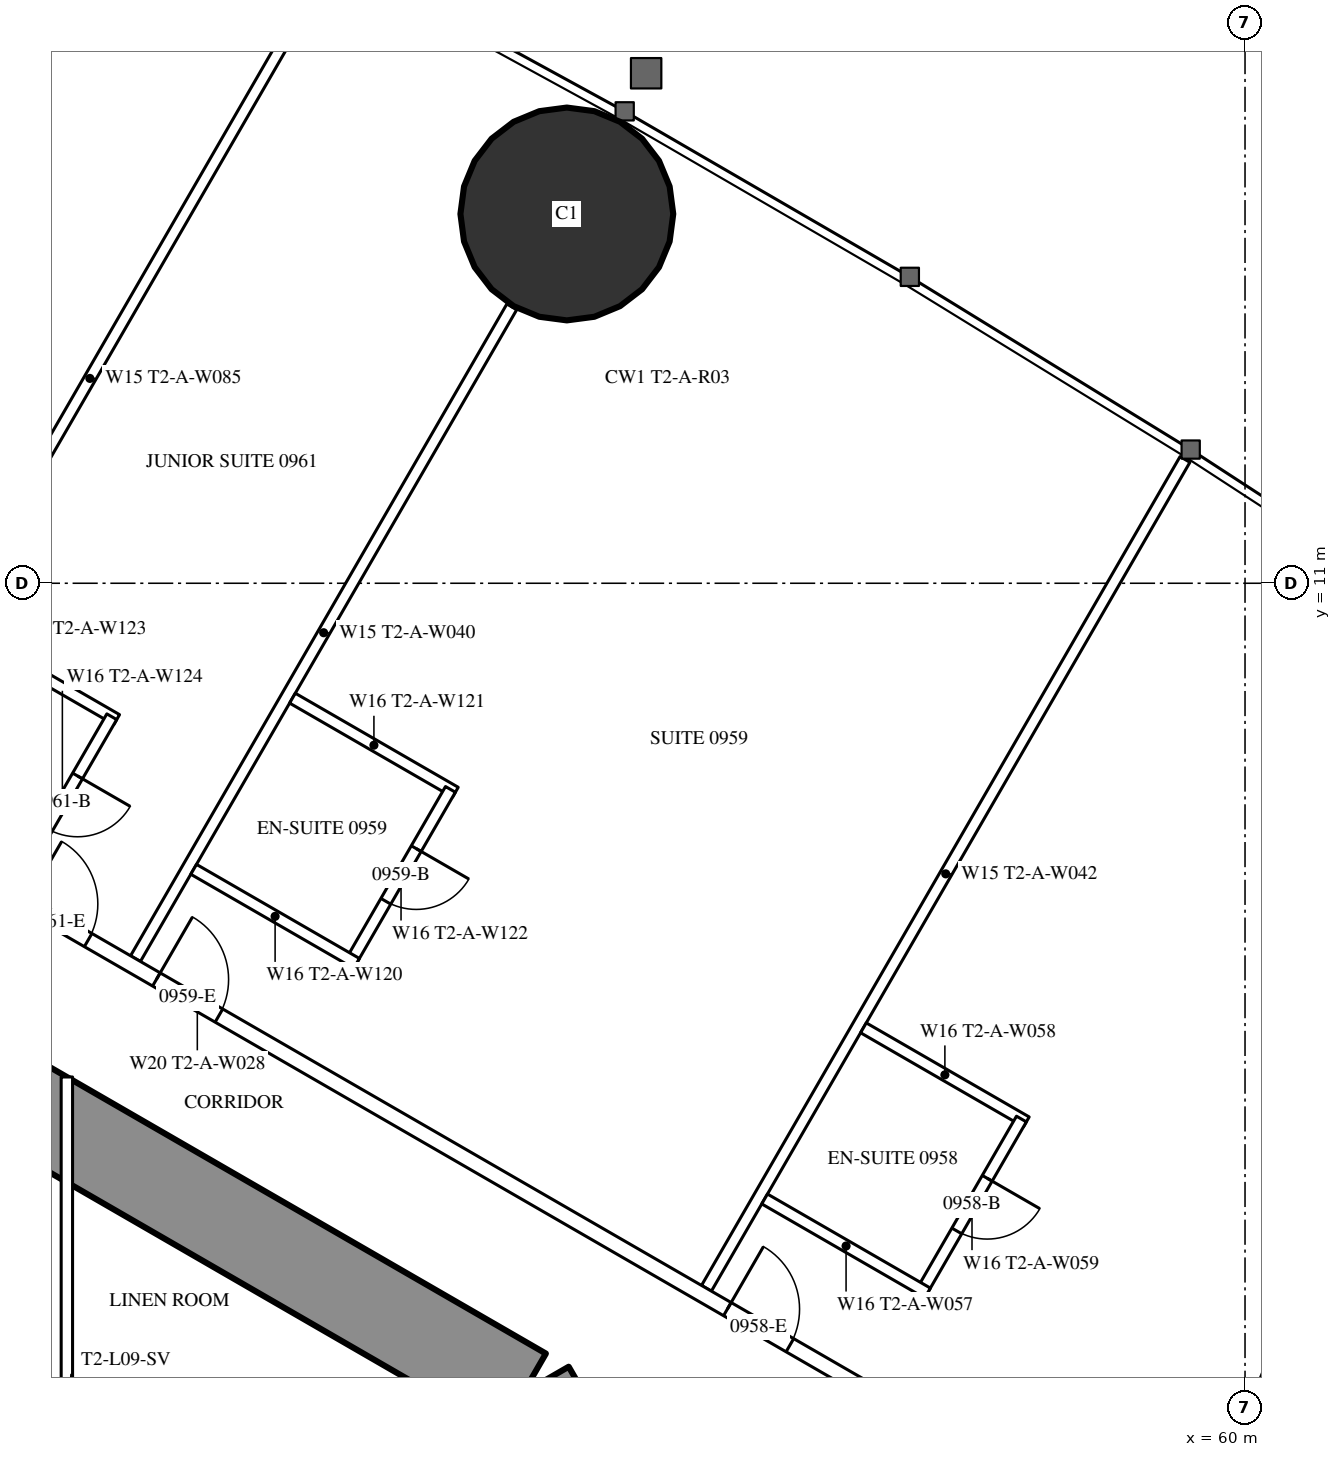
"""IFC4 building model, lengths in metres.
Left out: names, types, materials, properties, quantities, classifications, styles, units other than length and angle.
Written with IfcOpenShell. Run it as: python <this file> out.ifc"""

import sys

from ifc_helpers import new_model, si_unit, direction, frame, frame_2d, origin, origin_2d, place, context, subcontext, project, spatial, rectangle, hollow_circle, extrude, element, fill, save


model = new_model("IFC4")
c1 = context("Model", 3, precision=1e-05, world=origin(), true_north=direction((0.0, 1.0)))
c2 = subcontext(c1, "Body", "Model", "MODEL_VIEW")
j1 = project(units=[si_unit("LENGTHUNIT", "METRE"), si_unit("PLANEANGLEUNIT", "RADIAN")], contexts=[c1])
p1 = place(None, origin())
s1 = spatial("IfcSite", under=j1, at=p1, CompositionType="ELEMENT")
p2 = place(p1, origin())
s2 = spatial("IfcBuilding", under=s1, at=p2, CompositionType="ELEMENT")
p3 = place(p2, frame((0.0, 0.0, 39.0)))
s3 = spatial("IfcBuildingStorey", under=s2, at=p3, CompositionType="ELEMENT", Elevation=39.0)
p4 = place(p3, frame((51.078, 15.858, 0.0), z_axis=(0.0, 0.0, 1.0), x_axis=(1.0, 0.0, 0.0)))
e1 = element("IfcColumn", 1, at=p4, inside=s3, PredefinedType="COLUMN", context=c2, shape_type="SweptSolid", body=[
    extrude(hollow_circle(Radius=1.4, WallThickness=0.12, at=origin_2d()), origin(), (0.0, 0.0, 1.0), 3.5),
])
p5 = place(p3, frame((61.5, 0.0, 0.0), z_axis=(0.0, 0.0, 1.0), x_axis=(1.0, 0.0, 0.0)))
e2 = element("IfcColumn", 2, at=p5, inside=s3, PredefinedType="COLUMN", context=c2, shape_type="SweptSolid", body=[
    extrude(hollow_circle(Radius=1.4, WallThickness=0.1, at=origin_2d()), origin(), (0.0, 0.0, 1.0), 3.5),
])
p6 = place(p3, frame((27.2, -13.8, 0.0), z_axis=(0.0, 0.0, 1.0), x_axis=(0.866027159892, 0.499996958321, 0.0)))
e3 = element("IfcWall", 3, at=p6, inside=s3, PredefinedType="SHEAR", context=c2, shape_type="SweptSolid", body=[
    extrude(rectangle(XDim=27.947, YDim=1.2, at=frame_2d((13.973, 0.0))), origin(), (0.0, 0.0, 1.0), 3.5),
])
p7 = place(p6, frame((4.6, 0.0, 0.0)))
e4 = element("IfcOpeningElement", 4, at=p7, cuts=e3, PredefinedType="OPENING", context=c2, shape_type="SweptSolid", body=[
    extrude(rectangle(XDim=1.0, YDim=2.2, at=frame_2d((0.5, 1.1))), frame((0.0, 0.61, 0.0), z_axis=(0.0, -1.0, 0.0), x_axis=(1.0, 0.0, 0.0)), (0.0, 0.0, 1.0), 1.22),
])
p8 = place(p6, frame((13.395, 0.0, 0.0)))
e5 = element("IfcOpeningElement", 5, at=p8, cuts=e3, PredefinedType="OPENING", context=c2, shape_type="SweptSolid", body=[
    extrude(rectangle(XDim=1.8, YDim=2.2, at=frame_2d((0.9, 1.1))), frame((0.0, 0.61, 0.0), z_axis=(0.0, -1.0, 0.0), x_axis=(1.0, 0.0, 0.0)), (0.0, 0.0, 1.0), 1.22),
])
p9 = place(p3, frame((27.2, 13.8, 0.0), z_axis=(0.0, 0.0, 1.0), x_axis=(0.866024515034, -0.500001539357, 0.0)))
e6 = element("IfcWall", 6, at=p9, inside=s3, PredefinedType="SHEAR", context=c2, shape_type="SweptSolid", body=[
    extrude(rectangle(XDim=26.907, YDim=1.2, at=frame_2d((13.454, 0.0))), origin(), (0.0, 0.0, 1.0), 3.5),
])
p10 = place(p9, frame((4.6, 0.0, 0.0)))
e7 = element("IfcOpeningElement", 7, at=p10, cuts=e6, PredefinedType="OPENING", context=c2, shape_type="SweptSolid", body=[
    extrude(rectangle(XDim=1.0, YDim=2.2, at=frame_2d((0.5, 1.1))), frame((0.0, 0.61, 0.0), z_axis=(0.0, -1.0, 0.0), x_axis=(1.0, 0.0, 0.0)), (0.0, 0.0, 1.0), 1.22),
])
p11 = place(p9, frame((13.395, 0.0, 0.0)))
e8 = element("IfcOpeningElement", 8, at=p11, cuts=e6, PredefinedType="OPENING", context=c2, shape_type="SweptSolid", body=[
    extrude(rectangle(XDim=1.8, YDim=2.2, at=frame_2d((0.9, 1.1))), frame((0.0, 0.61, 0.0), z_axis=(0.0, -1.0, 0.0), x_axis=(1.0, 0.0, 0.0)), (0.0, 0.0, 1.0), 1.22),
])
p12 = place(p3, frame((41.647, 8.23, 0.0), z_axis=(0.0, 0.0, 1.0), x_axis=(0.49998590462, 0.866033541603, 0.0)))
e9 = element("IfcWall", 9, at=p12, inside=s3, PredefinedType="PARTITIONING", context=c2, shape_type="SweptSolid", body=[
    extrude(rectangle(XDim=12.621, YDim=0.15, at=frame_2d((6.311, 0.0))), origin(), (0.0, 0.0, 1.0), 3.25),
])
p13 = place(p3, frame((45.403, 6.062, 0.0), z_axis=(0.0, 0.0, 1.0), x_axis=(0.500013434677, 0.866017647131, 0.0)))
e10 = element("IfcWall", 10, at=p13, inside=s3, PredefinedType="PARTITIONING", context=c2, shape_type="SweptSolid", body=[
    extrude(rectangle(XDim=9.902, YDim=0.15, at=frame_2d((4.951, 0.0))), origin(), (0.0, 0.0, 1.0), 2.25),
])
p14 = place(p3, frame((52.915, 1.725, 0.0), z_axis=(0.0, 0.0, 1.0), x_axis=(0.499997163113, 0.866027041656, 0.0)))
e11 = element("IfcWall", 11, at=p14, inside=s3, PredefinedType="PARTITIONING", context=c2, shape_type="SweptSolid", body=[
    extrude(rectangle(XDim=12.591, YDim=0.15, at=frame_2d((6.295, 0.0))), origin(), (0.0, 0.0, 1.0), 3.25),
])
p15 = place(p3, frame((36.834, 10.894, 0.0), z_axis=(0.0, 0.0, 1.0), x_axis=(0.866028157229, -0.499995230863, 0.0)))
e12 = element("IfcWall", 12, at=p15, inside=s3, PredefinedType="PARTITIONING", context=c2, shape_type="SweptSolid", body=[
    extrude(rectangle(XDim=21.667, YDim=0.2, at=frame_2d((10.833, 0.0))), origin(), (0.0, 0.0, 1.0), 3.25),
])
p16 = place(p15, frame((18.885, 0.0, 0.0)))
e13 = element("IfcOpeningElement", 13, at=p16, cuts=e12, PredefinedType="OPENING", context=c2, shape_type="SweptSolid", body=[
    extrude(rectangle(XDim=0.95, YDim=2.2, at=frame_2d((0.475, 1.1))), frame((0.0, 0.11, 0.0), z_axis=(0.0, -1.0, 0.0), x_axis=(1.0, 0.0, 0.0)), (0.0, 0.0, 1.0), 0.22),
])
p17 = place(p15, frame((10.212, 0.0, 0.0)))
e14 = element("IfcOpeningElement", 14, at=p17, cuts=e12, PredefinedType="OPENING", context=c2, shape_type="SweptSolid", body=[
    extrude(rectangle(XDim=0.95, YDim=2.2, at=frame_2d((0.475, 1.1))), frame((0.0, 0.11, 0.0), z_axis=(0.0, -1.0, 0.0), x_axis=(1.0, 0.0, 0.0)), (0.0, 0.0, 1.0), 0.22),
])
p18 = place(p15, frame((8.225, 0.0, 0.0)))
e15 = element("IfcOpeningElement", 15, at=p18, cuts=e12, PredefinedType="OPENING", context=c2, shape_type="SweptSolid", body=[
    extrude(rectangle(XDim=0.95, YDim=2.2, at=frame_2d((0.475, 1.1))), frame((0.0, 0.11, 0.0), z_axis=(0.0, -1.0, 0.0), x_axis=(1.0, 0.0, 0.0)), (0.0, 0.0, 1.0), 0.22),
])
p19 = place(p15, frame((1.825, 0.0, 0.0)))
e16 = element("IfcOpeningElement", 16, at=p19, cuts=e12, PredefinedType="OPENING", context=c2, shape_type="SweptSolid", body=[
    extrude(rectangle(XDim=0.95, YDim=2.2, at=frame_2d((0.475, 1.1))), frame((0.0, 0.11, 0.0), z_axis=(0.0, -1.0, 0.0), x_axis=(1.0, 0.0, 0.0)), (0.0, 0.0, 1.0), 0.22),
])
p20 = place(p15, frame((0.246, 0.0, 0.0)))
e17 = element("IfcOpeningElement", 17, at=p20, cuts=e12, PredefinedType="OPENING", context=c2, shape_type="SweptSolid", body=[
    extrude(rectangle(XDim=0.9, YDim=2.2, at=frame_2d((0.45, 1.1))), frame((0.0, 0.11, 0.0), z_axis=(0.0, -1.0, 0.0), x_axis=(1.0, 0.0, 0.0)), (0.0, 0.0, 1.0), 0.22),
])
p21 = place(p3, frame((54.98, 5.151, 0.0), z_axis=(0.0, 0.0, 1.0), x_axis=(0.86604923931, -0.499958713387, 0.0)))
e18 = element("IfcWall", 18, at=p21, inside=s3, PredefinedType="PARTITIONING", context=c2, shape_type="SweptSolid", body=[
    extrude(rectangle(XDim=2.475, YDim=0.15, at=frame_2d((1.237, 0.0))), origin(), (0.0, 0.0, 1.0), 3.25),
])
p22 = place(p3, frame((55.758, 1.7, 0.0), z_axis=(0.0, 0.0, 1.0), x_axis=(0.500006934395, 0.866021400173, 0.0)))
e19 = element("IfcWall", 19, at=p22, inside=s3, PredefinedType="PARTITIONING", context=c2, shape_type="SweptSolid", body=[
    extrude(rectangle(XDim=2.6, YDim=0.15, at=frame_2d((1.3, 0.0))), origin(), (0.0, 0.0, 1.0), 3.25),
])
p23 = place(p22, frame((0.9, 0.0, 0.0)))
e20 = element("IfcOpeningElement", 20, at=p23, cuts=e19, PredefinedType="OPENING", context=c2, shape_type="SweptSolid", body=[
    extrude(rectangle(XDim=0.8, YDim=2.2, at=frame_2d((0.4, 1.1))), frame((0.0, 0.085, 0.0), z_axis=(0.0, -1.0, 0.0), x_axis=(1.0, 0.0, 0.0)), (0.0, 0.0, 1.0), 0.17),
])
for number, where, z_axis, x_axis in (
    (21, (53.68, 2.9, 0.0), (0.0, 0.0, 1.0), (0.866, -0.5, 0.0)),
    (22, (47.468, 9.488, 0.0), (0.0, 0.0, 1.0), (0.866, -0.5, 0.0)),
):
    element("IfcWall", number, at=place(p3, frame(where, z_axis=z_axis, x_axis=x_axis)), inside=s3, PredefinedType="PARTITIONING", context=c2, shape_type="SweptSolid", body=[
        extrude(rectangle(XDim=2.475, YDim=0.15, at=frame_2d((1.237, 0.0))), origin(), (0.0, 0.0, 1.0), 3.25),
    ])
p24 = place(p3, frame((48.246, 6.037, 0.0), z_axis=(0.0, 0.0, 1.0), x_axis=(0.500006934395, 0.866021400173, 0.0)))
e23 = element("IfcWall", 23, at=p24, inside=s3, PredefinedType="PARTITIONING", context=c2, shape_type="SweptSolid", body=[
    extrude(rectangle(XDim=2.6, YDim=0.15, at=frame_2d((1.3, 0.0))), origin(), (0.0, 0.0, 1.0), 3.25),
])
p25 = place(p24, frame((0.9, 0.0, 0.0)))
e24 = element("IfcOpeningElement", 24, at=p25, cuts=e23, PredefinedType="OPENING", context=c2, shape_type="SweptSolid", body=[
    extrude(rectangle(XDim=0.8, YDim=2.2, at=frame_2d((0.4, 1.1))), frame((0.0, 0.085, 0.0), z_axis=(0.0, -1.0, 0.0), x_axis=(1.0, 0.0, 0.0)), (0.0, 0.0, 1.0), 0.17),
])
p26 = place(p3, frame((46.168, 7.237, 0.0), z_axis=(0.0, 0.0, 1.0), x_axis=(0.866006523861, -0.500032699561, 0.0)))
e25 = element("IfcWall", 25, at=p26, inside=s3, PredefinedType="PARTITIONING", context=c2, shape_type="SweptSolid", body=[
    extrude(rectangle(XDim=2.475, YDim=0.15, at=frame_2d((1.237, 0.0))), origin(), (0.0, 0.0, 1.0), 3.25),
])
p27 = place(p3, frame((43.012, 10.444, 0.0), z_axis=(0.0, 0.0, 1.0), x_axis=(0.866031185235, -0.4999899861, 0.0)))
e26 = element("IfcWall", 26, at=p27, inside=s3, PredefinedType="PARTITIONING", context=c2, shape_type="SweptSolid", body=[
    extrude(rectangle(XDim=2.475, YDim=0.15, at=frame_2d((1.238, 0.0))), origin(), (0.0, 0.0, 1.0), 3.25),
])
p28 = place(p3, frame((43.791, 6.993, 0.0), z_axis=(0.0, 0.0, 1.0), x_axis=(0.500047596559, 0.865997922154, 0.0)))
e27 = element("IfcWall", 27, at=p28, inside=s3, PredefinedType="PARTITIONING", context=c2, shape_type="SweptSolid", body=[
    extrude(rectangle(XDim=2.6, YDim=0.15, at=frame_2d((1.3, 0.0))), origin(), (0.0, 0.0, 1.0), 3.25),
])
p29 = place(p28, frame((0.9, 0.0, 0.0)))
e28 = element("IfcOpeningElement", 28, at=p29, cuts=e27, PredefinedType="OPENING", context=c2, shape_type="SweptSolid", body=[
    extrude(rectangle(XDim=0.8, YDim=2.2, at=frame_2d((0.4, 1.1))), frame((0.0, 0.085, 0.0), z_axis=(0.0, -1.0, 0.0), x_axis=(1.0, 0.0, 0.0)), (0.0, 0.0, 1.0), 0.17),
])
p30 = place(p3, frame((44.5, -4.505, 0.0), z_axis=(0.0, 0.0, 1.0), x_axis=(0.0, 1.0, 0.0)))
e29 = element("IfcWall", 29, at=p30, inside=s3, PredefinedType="PARTITIONING", context=c2, shape_type="SweptSolid", body=[
    extrude(rectangle(XDim=9.009, YDim=0.15, at=frame_2d((4.505, 0.0))), origin(), (0.0, 0.0, 1.0), 2.45),
])
p31 = place(p30, frame((4.005, 0.0, 0.0)))
e30 = element("IfcOpeningElement", 30, at=p31, cuts=e29, PredefinedType="OPENING", context=c2, shape_type="SweptSolid", body=[
    extrude(rectangle(XDim=1.0, YDim=2.2, at=frame_2d((0.5, 1.1))), frame((0.0, 0.085, 0.0), z_axis=(0.0, -1.0, 0.0), x_axis=(1.0, 0.0, 0.0)), (0.0, 0.0, 1.0), 0.17),
])
p32 = place(p23, origin())
e31 = element("IfcDoor", 31, at=p32, inside=s3, OperationType="SINGLE_SWING_RIGHT", PredefinedType="DOOR", context=c2, shape_type="SweptSolid", body=[
    extrude(rectangle(XDim=0.8, YDim=2.2, at=frame_2d((0.4, 1.1))), frame((0.0, 0.025, 0.0), z_axis=(0.0, -1.0, 0.0), x_axis=(1.0, 0.0, 0.0)), (0.0, 0.0, 1.0), 0.05),
])
fill(e20, e31)
p33 = place(p16, origin())
e32 = element("IfcDoor", 32, at=p33, inside=s3, OperationType="SINGLE_SWING_LEFT", PredefinedType="DOOR", context=c2, shape_type="SweptSolid", body=[
    extrude(rectangle(XDim=0.95, YDim=2.2, at=frame_2d((0.475, 1.1))), frame((0.0, 0.025, 0.0), z_axis=(0.0, -1.0, 0.0), x_axis=(1.0, 0.0, 0.0)), (0.0, 0.0, 1.0), 0.05),
])
fill(e13, e32)
p34 = place(p25, origin())
e33 = element("IfcDoor", 33, at=p34, inside=s3, OperationType="SINGLE_SWING_RIGHT", PredefinedType="DOOR", context=c2, shape_type="SweptSolid", body=[
    extrude(rectangle(XDim=0.8, YDim=2.2, at=frame_2d((0.4, 1.1))), frame((0.0, 0.025, 0.0), z_axis=(0.0, -1.0, 0.0), x_axis=(1.0, 0.0, 0.0)), (0.0, 0.0, 1.0), 0.05),
])
fill(e24, e33)
p35 = place(p17, origin())
e34 = element("IfcDoor", 34, at=p35, inside=s3, OperationType="SINGLE_SWING_LEFT", PredefinedType="DOOR", context=c2, shape_type="SweptSolid", body=[
    extrude(rectangle(XDim=0.95, YDim=2.2, at=frame_2d((0.475, 1.1))), frame((0.0, 0.025, 0.0), z_axis=(0.0, -1.0, 0.0), x_axis=(1.0, 0.0, 0.0)), (0.0, 0.0, 1.0), 0.05),
])
fill(e14, e34)
p36 = place(p29, origin())
e35 = element("IfcDoor", 35, at=p36, inside=s3, OperationType="SINGLE_SWING_RIGHT", PredefinedType="DOOR", context=c2, shape_type="SweptSolid", body=[
    extrude(rectangle(XDim=0.8, YDim=2.2, at=frame_2d((0.4, 1.1))), frame((0.0, 0.025, 0.0), z_axis=(0.0, -1.0, 0.0), x_axis=(1.0, 0.0, 0.0)), (0.0, 0.0, 1.0), 0.05),
])
fill(e28, e35)
p37 = place(p18, origin())
e36 = element("IfcDoor", 36, at=p37, inside=s3, OperationType="SINGLE_SWING_LEFT", PredefinedType="DOOR", context=c2, shape_type="SweptSolid", body=[
    extrude(rectangle(XDim=0.95, YDim=2.2, at=frame_2d((0.475, 1.1))), frame((0.0, 0.025, 0.0), z_axis=(0.0, -1.0, 0.0), x_axis=(1.0, 0.0, 0.0)), (0.0, 0.0, 1.0), 0.05),
])
fill(e15, e36)
save(model, sys.argv[1])
